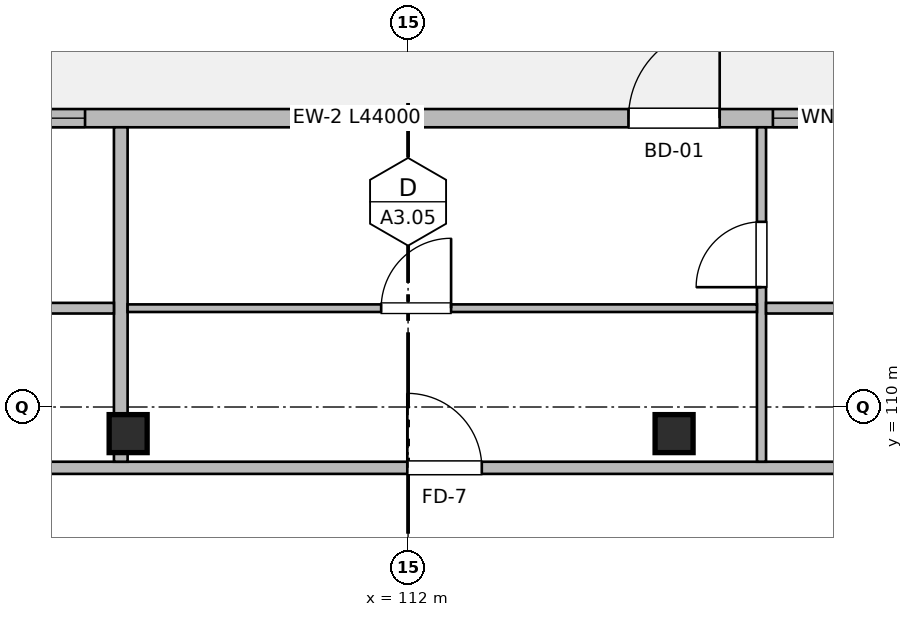
"""IFC4 building model, lengths in metres.
Left out: names, types, materials, properties, quantities, classifications, styles, units other than length and angle.
Written with IfcOpenShell. Run it as: python <this file> out.ifc"""

import sys

from ifc_helpers import new_model, si_unit, direction, frame, frame_2d, origin, origin_2d, place, context, subcontext, project, spatial, rectangle, extrude, element, fill, save


model = new_model("IFC4")
c1 = context("Model", 3, precision=1e-05, world=origin(), true_north=direction((0.0, 1.0)))
c2 = subcontext(c1, "Body", "Model", "MODEL_VIEW")
j1 = project(units=[si_unit("LENGTHUNIT", "METRE"), si_unit("PLANEANGLEUNIT", "RADIAN")], contexts=[c1])
p1 = place(None, origin())
s1 = spatial("IfcSite", under=j1, at=p1, CompositionType="ELEMENT")
p2 = place(p1, origin())
s2 = spatial("IfcBuilding", under=s1, at=p2, CompositionType="ELEMENT")
p3 = place(p2, frame((0.0, 0.0, 36.16)))
s3 = spatial("IfcBuildingStorey", under=s2, at=p3, CompositionType="ELEMENT", Elevation=36.16)
for number, where, z_axis, x_axis in (
    (1, (108.317, 109.65, 0.0), (0.0, 0.0, 1.0), (1.0, 0.0, 0.0)),
    (2, (115.5, 109.65, 0.0), (0.0, 0.0, 1.0), (1.0, 0.0, 0.0)),
):
    element("IfcColumn", number, at=place(p3, frame(where, z_axis=z_axis, x_axis=x_axis)), inside=s3, PredefinedType="COLUMN", context=c2, shape_type="SweptSolid", body=[
        extrude(rectangle(XDim=0.5, YDim=0.5, at=origin_2d()), origin(), (0.0, 0.0, 1.0), 3.2),
    ])
p4 = place(p3, frame((93.5, 113.8, 0.0), z_axis=(0.0, 0.0, 1.0), x_axis=(1.0, 0.0, 0.0)))
e3 = element("IfcWall", 3, at=p4, inside=s3, PredefinedType="SOLIDWALL", context=c2, shape_type="SweptSolid", body=[
    extrude(rectangle(XDim=44.0, YDim=0.24, at=frame_2d((22.0, 0.0))), origin(), (0.0, 0.0, 1.0), 2.98),
])
p5 = place(p4, frame((3.8, 0.0, 0.0)))
e4 = element("IfcOpeningElement", 4, at=p5, cuts=e3, PredefinedType="OPENING", context=c2, shape_type="SweptSolid", body=[
    extrude(rectangle(XDim=1.2, YDim=2.2, at=frame_2d((0.6, 1.1))), frame((0.0, 0.13, 0.0), z_axis=(0.0, -1.0, 0.0), x_axis=(1.0, 0.0, 0.0)), (0.0, 0.0, 1.0), 0.26),
])
p6 = place(p4, frame((5.7, 0.0, 0.72)))
e5 = element("IfcOpeningElement", 5, at=p6, cuts=e3, PredefinedType="OPENING", context=c2, shape_type="SweptSolid", body=[
    extrude(rectangle(XDim=2.0, YDim=1.5, at=frame_2d((1.0, 0.75))), frame((0.0, 0.13, 0.0), z_axis=(0.0, -1.0, 0.0), x_axis=(1.0, 0.0, 0.0)), (0.0, 0.0, 1.0), 0.26),
])
p7 = place(p4, frame((12.15, 0.0, 0.67)))
e6 = element("IfcOpeningElement", 6, at=p7, cuts=e3, PredefinedType="OPENING", context=c2, shape_type="SweptSolid", body=[
    extrude(rectangle(XDim=2.1, YDim=1.55, at=frame_2d((1.05, 0.775))), frame((0.0, 0.13, 0.0), z_axis=(0.0, -1.0, 0.0), x_axis=(1.0, 0.0, 0.0)), (0.0, 0.0, 1.0), 0.26),
])
p8 = place(p4, frame((21.4, 0.0, 0.0)))
e7 = element("IfcOpeningElement", 7, at=p8, cuts=e3, PredefinedType="OPENING", context=c2, shape_type="SweptSolid", body=[
    extrude(rectangle(XDim=1.2, YDim=2.2, at=frame_2d((0.6, 1.1))), frame((0.0, 0.13, 0.0), z_axis=(0.0, -1.0, 0.0), x_axis=(1.0, 0.0, 0.0)), (0.0, 0.0, 1.0), 0.26),
])
p9 = place(p4, frame((23.3, 0.0, 0.77)))
e8 = element("IfcOpeningElement", 8, at=p9, cuts=e3, PredefinedType="OPENING", context=c2, shape_type="SweptSolid", body=[
    extrude(rectangle(XDim=1.6, YDim=1.45, at=frame_2d((0.8, 0.725))), frame((0.0, 0.13, 0.0), z_axis=(0.0, -1.0, 0.0), x_axis=(1.0, 0.0, 0.0)), (0.0, 0.0, 1.0), 0.26),
])
p10 = place(p4, frame((30.275, 0.0, 0.9)))
e9 = element("IfcOpeningElement", 9, at=p10, cuts=e3, PredefinedType="OPENING", context=c2, shape_type="SweptSolid", body=[
    extrude(rectangle(XDim=1.05, YDim=1.15, at=frame_2d((0.525, 0.575))), frame((0.0, 0.13, 0.0), z_axis=(0.0, -1.0, 0.0), x_axis=(1.0, 0.0, 0.0)), (0.0, 0.0, 1.0), 0.26),
])
p11 = place(p4, frame((39.0, 0.0, 0.0)))
e10 = element("IfcOpeningElement", 10, at=p11, cuts=e3, PredefinedType="OPENING", context=c2, shape_type="SweptSolid", body=[
    extrude(rectangle(XDim=1.2, YDim=2.2, at=frame_2d((0.6, 1.1))), frame((0.0, 0.13, 0.0), z_axis=(0.0, -1.0, 0.0), x_axis=(1.0, 0.0, 0.0)), (0.0, 0.0, 1.0), 0.26),
])
p12 = place(p4, frame((40.9, 0.0, 0.82)))
e11 = element("IfcOpeningElement", 11, at=p12, cuts=e3, PredefinedType="OPENING", context=c2, shape_type="SweptSolid", body=[
    extrude(rectangle(XDim=1.5, YDim=1.4, at=frame_2d((0.75, 0.7))), frame((0.0, 0.13, 0.0), z_axis=(0.0, -1.0, 0.0), x_axis=(1.0, 0.0, 0.0)), (0.0, 0.0, 1.0), 0.26),
])
p13 = place(p3, frame((93.66, 109.2, 0.0), z_axis=(0.0, 0.0, 1.0), x_axis=(1.0, 0.0, 0.0)))
e12 = element("IfcWall", 12, at=p13, inside=s3, PredefinedType="PARTITIONING", context=c2, shape_type="SweptSolid", body=[
    extrude(rectangle(XDim=43.68, YDim=0.16, at=frame_2d((21.84, 0.0))), origin(), (0.0, 0.0, 1.0), 2.935),
])
p14 = place(p13, frame((3.705, 0.0, 0.0)))
e13 = element("IfcOpeningElement", 13, at=p14, cuts=e12, PredefinedType="OPENING", context=c2, shape_type="SweptSolid", body=[
    extrude(rectangle(XDim=0.98, YDim=2.15, at=frame_2d((0.49, 1.075))), frame((0.0, 0.09, 0.0), z_axis=(0.0, -1.0, 0.0), x_axis=(1.0, 0.0, 0.0)), (0.0, 0.0, 1.0), 0.18),
])
p15 = place(p13, frame((18.33, 0.0, 0.0)))
e14 = element("IfcOpeningElement", 14, at=p15, cuts=e12, PredefinedType="OPENING", context=c2, shape_type="SweptSolid", body=[
    extrude(rectangle(XDim=0.98, YDim=2.15, at=frame_2d((0.49, 1.075))), frame((0.0, 0.09, 0.0), z_axis=(0.0, -1.0, 0.0), x_axis=(1.0, 0.0, 0.0)), (0.0, 0.0, 1.0), 0.18),
])
p16 = place(p13, frame((32.915, 0.0, 0.0)))
e15 = element("IfcOpeningElement", 15, at=p16, cuts=e12, PredefinedType="OPENING", context=c2, shape_type="SweptSolid", body=[
    extrude(rectangle(XDim=0.98, YDim=2.15, at=frame_2d((0.49, 1.075))), frame((0.0, 0.09, 0.0), z_axis=(0.0, -1.0, 0.0), x_axis=(1.0, 0.0, 0.0)), (0.0, 0.0, 1.0), 0.18),
])
p17 = place(p3, frame((108.22, 109.28, 0.0), z_axis=(0.0, 0.0, 1.0), x_axis=(0.0, 1.0, 0.0)))
e16 = element("IfcWall", 16, at=p17, inside=s3, PredefinedType="PARTITIONING", context=c2, shape_type="SweptSolid", body=[
    extrude(rectangle(XDim=4.4, YDim=0.18, at=frame_2d((2.2, 0.0))), origin(), (0.0, 0.0, 1.0), 2.935),
])
p18 = place(p3, frame((102.11, 111.3, 0.0), z_axis=(0.0, 0.0, 1.0), x_axis=(1.0, 0.0, 0.0)))
e17 = element("IfcWall", 17, at=p18, inside=s3, PredefinedType="PARTITIONING", context=c2, shape_type="SweptSolid", body=[
    extrude(rectangle(XDim=6.02, YDim=0.14, at=frame_2d((3.01, 0.0))), origin(), (0.0, 0.0, 1.0), 2.935),
])
p19 = place(p18, frame((2.432, 0.0, 0.0)))
e18 = element("IfcOpeningElement", 18, at=p19, cuts=e17, PredefinedType="OPENING", context=c2, shape_type="SweptSolid", body=[
    extrude(rectangle(XDim=0.85, YDim=2.05, at=frame_2d((0.425, 1.025))), frame((0.0, 0.08, 0.0), z_axis=(0.0, -1.0, 0.0), x_axis=(1.0, 0.0, 0.0)), (0.0, 0.0, 1.0), 0.16),
])
p20 = place(p3, frame((116.65, 109.28, 0.0), z_axis=(0.0, 0.0, 1.0), x_axis=(0.0, 1.0, 0.0)))
e19 = element("IfcWall", 19, at=p20, inside=s3, PredefinedType="PARTITIONING", context=c2, shape_type="SweptSolid", body=[
    extrude(rectangle(XDim=4.4, YDim=0.12, at=frame_2d((2.2, 0.0))), origin(), (0.0, 0.0, 1.0), 2.935),
])
p21 = place(p20, frame((2.296, 0.0, 0.0)))
e20 = element("IfcOpeningElement", 20, at=p21, cuts=e19, PredefinedType="OPENING", context=c2, shape_type="SweptSolid", body=[
    extrude(rectangle(XDim=0.86, YDim=2.1, at=frame_2d((0.43, 1.05))), frame((0.0, 0.07, 0.0), z_axis=(0.0, -1.0, 0.0), x_axis=(1.0, 0.0, 0.0)), (0.0, 0.0, 1.0), 0.14),
])
p22 = place(p3, frame((116.71, 111.3, 0.0), z_axis=(0.0, 0.0, 1.0), x_axis=(1.0, 0.0, 0.0)))
e21 = element("IfcWall", 21, at=p22, inside=s3, PredefinedType="PARTITIONING", context=c2, shape_type="SweptSolid", body=[
    extrude(rectangle(XDim=5.98, YDim=0.14, at=frame_2d((2.99, 0.0))), origin(), (0.0, 0.0, 1.0), 2.935),
])
p23 = place(p22, frame((2.416, 0.0, 0.0)))
e22 = element("IfcOpeningElement", 22, at=p23, cuts=e21, PredefinedType="OPENING", context=c2, shape_type="SweptSolid", body=[
    extrude(rectangle(XDim=0.85, YDim=2.05, at=frame_2d((0.425, 1.025))), frame((0.0, 0.08, 0.0), z_axis=(0.0, -1.0, 0.0), x_axis=(1.0, 0.0, 0.0)), (0.0, 0.0, 1.0), 0.16),
])
p24 = place(p3, frame((108.31, 111.3, 0.0), z_axis=(0.0, 0.0, 1.0), x_axis=(1.0, 0.0, 0.0)))
e23 = element("IfcWall", 23, at=p24, inside=s3, PredefinedType="PARTITIONING", context=c2, shape_type="SweptSolid", body=[
    extrude(rectangle(XDim=8.28, YDim=0.1, at=frame_2d((4.14, 0.0))), origin(), (0.0, 0.0, 1.0), 2.935),
])
p25 = place(p24, frame((3.336, 0.0, 0.0)))
e24 = element("IfcOpeningElement", 24, at=p25, cuts=e23, PredefinedType="OPENING", context=c2, shape_type="SweptSolid", body=[
    extrude(rectangle(XDim=0.92, YDim=2.1, at=frame_2d((0.46, 1.05))), frame((0.0, 0.06, 0.0), z_axis=(0.0, -1.0, 0.0), x_axis=(1.0, 0.0, 0.0)), (0.0, 0.0, 1.0), 0.12),
])
p26 = place(p7, origin())
e25 = element("IfcWindow", 25, at=p26, inside=s3, PartitioningType="SINGLE_PANEL", PredefinedType="WINDOW", context=c2, shape_type="SweptSolid", body=[
    extrude(rectangle(XDim=2.1, YDim=1.55, at=frame_2d((1.05, 0.775))), frame((0.0, 0.03, 0.0), z_axis=(0.0, -1.0, 0.0), x_axis=(1.0, 0.0, 0.0)), (0.0, 0.0, 1.0), 0.06),
])
fill(e6, e25)
p27 = place(p8, origin())
e26 = element("IfcDoor", 26, at=p27, inside=s3, OperationType="SINGLE_SWING_RIGHT", PredefinedType="DOOR", context=c2, shape_type="SweptSolid", body=[
    extrude(rectangle(XDim=1.2, YDim=2.2, at=frame_2d((0.6, 1.1))), frame((0.0, 0.025, 0.0), z_axis=(0.0, -1.0, 0.0), x_axis=(1.0, 0.0, 0.0)), (0.0, 0.0, 1.0), 0.05),
])
fill(e7, e26)
p28 = place(p9, origin())
e27 = element("IfcWindow", 27, at=p28, inside=s3, PartitioningType="SINGLE_PANEL", PredefinedType="WINDOW", context=c2, shape_type="SweptSolid", body=[
    extrude(rectangle(XDim=1.6, YDim=1.45, at=frame_2d((0.8, 0.725))), frame((0.0, 0.03, 0.0), z_axis=(0.0, -1.0, 0.0), x_axis=(1.0, 0.0, 0.0)), (0.0, 0.0, 1.0), 0.06),
])
fill(e8, e27)
p29 = place(p15, origin())
e28 = element("IfcDoor", 28, at=p29, inside=s3, OperationType="SINGLE_SWING_LEFT", PredefinedType="DOOR", context=c2, shape_type="SweptSolid", body=[
    extrude(rectangle(XDim=0.98, YDim=2.15, at=frame_2d((0.49, 1.075))), frame((0.0, 0.025, 0.0), z_axis=(0.0, -1.0, 0.0), x_axis=(1.0, 0.0, 0.0)), (0.0, 0.0, 1.0), 0.05),
])
fill(e14, e28)
p30 = place(p25, origin())
e29 = element("IfcDoor", 29, at=p30, inside=s3, OperationType="SINGLE_SWING_RIGHT", PredefinedType="DOOR", context=c2, shape_type="SweptSolid", body=[
    extrude(rectangle(XDim=0.92, YDim=2.1, at=frame_2d((0.46, 1.05))), frame((0.0, 0.025, 0.0), z_axis=(0.0, -1.0, 0.0), x_axis=(1.0, 0.0, 0.0)), (0.0, 0.0, 1.0), 0.05),
])
fill(e24, e29)
p31 = place(p21, origin())
e30 = element("IfcDoor", 30, at=p31, inside=s3, OperationType="SINGLE_SWING_LEFT", PredefinedType="DOOR", context=c2, shape_type="SweptSolid", body=[
    extrude(rectangle(XDim=0.86, YDim=2.1, at=frame_2d((0.43, 1.05))), frame((0.0, 0.025, 0.0), z_axis=(0.0, -1.0, 0.0), x_axis=(1.0, 0.0, 0.0)), (0.0, 0.0, 1.0), 0.05),
])
fill(e20, e30)
save(model, sys.argv[1])
